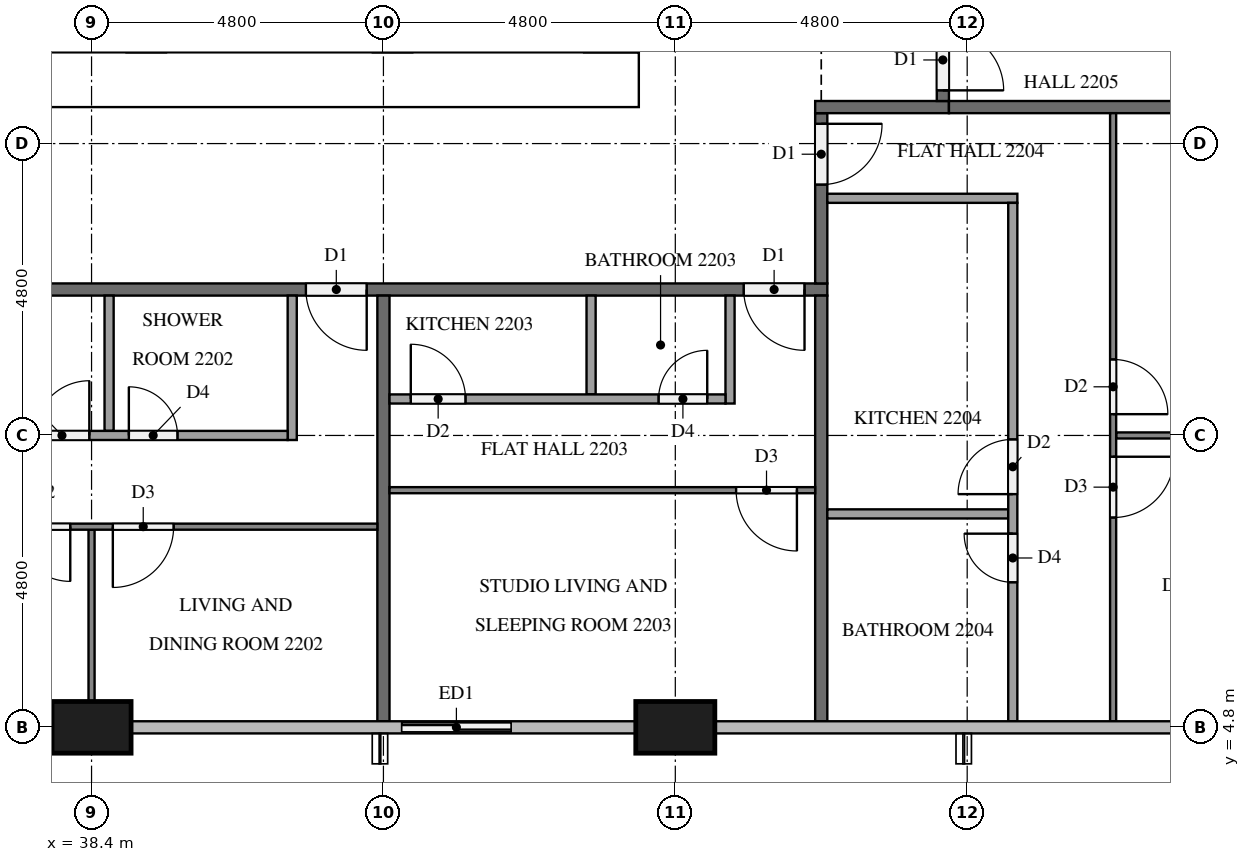
"""IFC4 building model, lengths in metres.
Left out: names, types, materials, properties, quantities, classifications, styles, units other than length and angle.
Written with IfcOpenShell. Run it as: python <this file> out.ifc"""

import sys

from ifc_helpers import new_model, si_unit, direction, frame, frame_2d, origin, origin_2d, place, context, subcontext, project, spatial, rectangle, extrude, element, fill, save


model = new_model("IFC4")
c1 = context("Model", 3, precision=1e-05, world=origin(), true_north=direction((0.0, 1.0)))
c2 = subcontext(c1, "Body", "Model", "MODEL_VIEW")
j1 = project(units=[si_unit("LENGTHUNIT", "METRE"), si_unit("PLANEANGLEUNIT", "RADIAN")], contexts=[c1])
p1 = place(None, origin())
s1 = spatial("IfcSite", under=j1, at=p1, CompositionType="ELEMENT")
p2 = place(p1, origin())
s2 = spatial("IfcBuilding", under=s1, at=p2, CompositionType="ELEMENT")
p3 = place(p2, frame((0.0, 0.0, 89.2)))
s3 = spatial("IfcBuildingStorey", under=s2, at=p3, CompositionType="ELEMENT", Elevation=89.2)
p4 = place(p3, frame((15.0, 15.45, 0.0), z_axis=(0.0, 0.0, 1.0), x_axis=(1.0, 0.0, 0.0)))
e1 = element("IfcWall", 1, at=p4, inside=s3, PredefinedType="SHEAR", context=c2, shape_type="SweptSolid", body=[
    extrude(rectangle(XDim=32.4, YDim=0.9, at=frame_2d((16.2, 0.0))), origin(), (0.0, 0.0, 1.0), 3.2),
])
p5 = place(p4, frame((15.3, 0.0, 0.0)))
e2 = element("IfcOpeningElement", 2, at=p5, cuts=e1, PredefinedType="OPENING", context=c2, shape_type="SweptSolid", body=[
    extrude(rectangle(XDim=1.8, YDim=2.1, at=frame_2d((0.9, 1.05))), frame((0.0, 0.46, 0.0), z_axis=(0.0, -1.0, 0.0), x_axis=(1.0, 0.0, 0.0)), (0.0, 0.0, 1.0), 0.92),
])
for number, where, z_axis, x_axis in (
    (3, (38.4, 4.8, 0.0), (0.0, 0.0, 1.0), (1.0, 0.0, 0.0)),
    (4, (48.0, 4.8, 0.0), (0.0, 0.0, 1.0), (1.0, 0.0, 0.0)),
):
    element("IfcColumn", number, at=place(p3, frame(where, z_axis=z_axis, x_axis=x_axis)), inside=s3, PredefinedType="COLUMN", context=c2, shape_type="SweptSolid", body=[
        extrude(rectangle(XDim=1.3, YDim=0.85, at=origin_2d()), origin(), (0.0, 0.0, 1.0), 3.2),
    ])
p6 = place(p3, frame((43.2, 4.8, 0.0), z_axis=(0.0, 0.0, 1.0), x_axis=(1.0, 0.0, 0.0)))
e5 = element("IfcWall", 5, at=p6, inside=s3, PredefinedType="SOLIDWALL", context=c2, shape_type="SweptSolid", body=[
    extrude(rectangle(XDim=2.4, YDim=0.15, at=frame_2d((1.2, 0.0))), origin(), (0.0, 0.0, 1.0), 3.2),
])
p7 = place(p6, frame((0.3, 0.0, 0.0)))
e6 = element("IfcOpeningElement", 6, at=p7, cuts=e5, PredefinedType="OPENING", context=c2, shape_type="SweptSolid", body=[
    extrude(rectangle(XDim=1.8, YDim=2.4, at=frame_2d((0.9, 1.2))), frame((0.0, 0.085, 0.0), z_axis=(0.0, -1.0, 0.0), x_axis=(1.0, 0.0, 0.0)), (0.0, 0.0, 1.0), 0.17),
])
p8 = place(p3, frame((50.5, 12.0, 0.0), z_axis=(0.0, 0.0, 1.0), x_axis=(-1.0, 0.0, 0.0)))
e7 = element("IfcWall", 7, at=p8, inside=s3, PredefinedType="PARTITIONING", context=c2, shape_type="SweptSolid", body=[
    extrude(rectangle(XDim=38.6, YDim=0.2, at=frame_2d((19.3, 0.0))), origin(), (0.0, 0.0, 1.0), 3.2),
])
p9 = place(p8, frame((21.975, 0.0, 0.0)))
e8 = element("IfcOpeningElement", 8, at=p9, cuts=e7, PredefinedType="OPENING", context=c2, shape_type="SweptSolid", body=[
    extrude(rectangle(XDim=1.0, YDim=2.1, at=frame_2d((0.5, 1.05))), frame((0.0, 0.11, 0.0), z_axis=(0.0, -1.0, 0.0), x_axis=(1.0, 0.0, 0.0)), (0.0, 0.0, 1.0), 0.22),
])
p10 = place(p8, frame((7.575, 0.0, 0.0)))
e9 = element("IfcOpeningElement", 9, at=p10, cuts=e7, PredefinedType="OPENING", context=c2, shape_type="SweptSolid", body=[
    extrude(rectangle(XDim=1.0, YDim=2.1, at=frame_2d((0.5, 1.05))), frame((0.0, 0.11, 0.0), z_axis=(0.0, -1.0, 0.0), x_axis=(1.0, 0.0, 0.0)), (0.0, 0.0, 1.0), 0.22),
])
p11 = place(p8, frame((0.375, 0.0, 0.0)))
e10 = element("IfcOpeningElement", 10, at=p11, cuts=e7, PredefinedType="OPENING", context=c2, shape_type="SweptSolid", body=[
    extrude(rectangle(XDim=1.0, YDim=2.1, at=frame_2d((0.5, 1.05))), frame((0.0, 0.11, 0.0), z_axis=(0.0, -1.0, 0.0), x_axis=(1.0, 0.0, 0.0)), (0.0, 0.0, 1.0), 0.22),
])
p12 = place(p3, frame((50.4, 14.9, 0.0), z_axis=(0.0, 0.0, 1.0), x_axis=(0.0, -1.0, 0.0)))
e11 = element("IfcWall", 11, at=p12, inside=s3, PredefinedType="PARTITIONING", context=c2, shape_type="SweptSolid", body=[
    extrude(rectangle(XDim=2.8, YDim=0.2, at=frame_2d((1.4, 0.0))), origin(), (0.0, 0.0, 1.0), 3.2),
])
p13 = place(p12, frame((0.175, 0.0, 0.0)))
e12 = element("IfcOpeningElement", 12, at=p13, cuts=e11, PredefinedType="OPENING", context=c2, shape_type="SweptSolid", body=[
    extrude(rectangle(XDim=1.0, YDim=2.1, at=frame_2d((0.5, 1.05))), frame((0.0, 0.11, 0.0), z_axis=(0.0, -1.0, 0.0), x_axis=(1.0, 0.0, 0.0)), (0.0, 0.0, 1.0), 0.22),
])
p14 = place(p3, frame((50.3, 15.0, 0.0), z_axis=(0.0, 0.0, 1.0), x_axis=(1.0, 0.0, 0.0)))
e13 = element("IfcWall", 13, at=p14, inside=s3, PredefinedType="PARTITIONING", context=c2, shape_type="SweptSolid", body=[
    extrude(rectangle(XDim=2.2, YDim=0.2, at=frame_2d((1.1, 0.0))), origin(), (0.0, 0.0, 1.0), 3.2),
])
p15 = place(p3, frame((52.4, 37.7, 0.0), z_axis=(0.0, 0.0, 1.0), x_axis=(0.0, -1.0, 0.0)))
e14 = element("IfcWall", 14, at=p15, inside=s3, PredefinedType="PARTITIONING", context=c2, shape_type="SweptSolid", body=[
    extrude(rectangle(XDim=22.6, YDim=0.2, at=frame_2d((11.3, 0.0))), origin(), (0.0, 0.0, 1.0), 3.2),
])
p16 = place(p15, frame((21.425, 0.0, 0.0)))
e15 = element("IfcOpeningElement", 15, at=p16, cuts=e14, PredefinedType="OPENING", context=c2, shape_type="SweptSolid", body=[
    extrude(rectangle(XDim=1.0, YDim=2.1, at=frame_2d((0.5, 1.05))), frame((0.0, 0.11, 0.0), z_axis=(0.0, -1.0, 0.0), x_axis=(1.0, 0.0, 0.0)), (0.0, 0.0, 1.0), 0.22),
])
p17 = place(p15, frame((0.175, 0.0, 0.0)))
e16 = element("IfcOpeningElement", 16, at=p17, cuts=e14, PredefinedType="OPENING", context=c2, shape_type="SweptSolid", body=[
    extrude(rectangle(XDim=1.0, YDim=2.1, at=frame_2d((0.5, 1.05))), frame((0.0, 0.11, 0.0), z_axis=(0.0, -1.0, 0.0), x_axis=(1.0, 0.0, 0.0)), (0.0, 0.0, 1.0), 0.22),
])
for number, where, z_axis, x_axis in (
    (17, (43.2, 11.9, 0.0), (0.0, 0.0, 1.0), (0.0, -1.0, 0.0)),
    (18, (50.4, 11.9, 0.0), (0.0, 0.0, 1.0), (0.0, -1.0, 0.0)),
):
    element("IfcWall", number, at=place(p3, frame(where, z_axis=z_axis, x_axis=x_axis)), inside=s3, PredefinedType="PARTITIONING", context=c2, shape_type="SweptSolid", body=[
        extrude(rectangle(XDim=7.0, YDim=0.2, at=frame_2d((3.5, 0.0))), origin(), (0.0, 0.0, 1.0), 3.2),
    ])
p18 = place(p3, frame((52.5, 15.0, 0.0), z_axis=(0.0, 0.0, 1.0), x_axis=(1.0, 0.0, 0.0)))
e19 = element("IfcWall", 19, at=p18, inside=s3, PredefinedType="PARTITIONING", context=c2, shape_type="SweptSolid", body=[
    extrude(rectangle(XDim=9.8, YDim=0.2, at=frame_2d((4.9, 0.0))), origin(), (0.0, 0.0, 1.0), 3.2),
])
p19 = place(p3, frame((38.4, 8.05, 0.0), z_axis=(0.0, 0.0, 1.0), x_axis=(0.0, -1.0, 0.0)))
e20 = element("IfcWall", 20, at=p19, inside=s3, PredefinedType="PARTITIONING", context=c2, shape_type="SweptSolid", body=[
    extrude(rectangle(XDim=2.825, YDim=0.1, at=frame_2d((1.413, 0.0))), origin(), (0.0, 0.0, 1.0), 3.2),
])
p20 = place(p3, frame((43.1, 8.1, 0.0), z_axis=(0.0, 0.0, 1.0), x_axis=(-1.0, 0.0, 0.0)))
e21 = element("IfcWall", 21, at=p20, inside=s3, PredefinedType="PARTITIONING", context=c2, shape_type="SweptSolid", body=[
    extrude(rectangle(XDim=14.2, YDim=0.1, at=frame_2d((7.1, 0.0))), origin(), (0.0, 0.0, 1.0), 3.2),
])
p21 = place(p20, frame((3.35, 0.0, 0.0)))
e22 = element("IfcOpeningElement", 22, at=p21, cuts=e21, PredefinedType="OPENING", context=c2, shape_type="SweptSolid", body=[
    extrude(rectangle(XDim=1.0, YDim=2.1, at=frame_2d((0.5, 1.05))), frame((0.0, 0.06, 0.0), z_axis=(0.0, -1.0, 0.0), x_axis=(1.0, 0.0, 0.0)), (0.0, 0.0, 1.0), 0.12),
])
p22 = place(p20, frame((5.05, 0.0, 0.0)))
e23 = element("IfcOpeningElement", 23, at=p22, cuts=e21, PredefinedType="OPENING", context=c2, shape_type="SweptSolid", body=[
    extrude(rectangle(XDim=0.9, YDim=2.1, at=frame_2d((0.45, 1.05))), frame((0.0, 0.06, 0.0), z_axis=(0.0, -1.0, 0.0), x_axis=(1.0, 0.0, 0.0)), (0.0, 0.0, 1.0), 0.12),
])
p23 = place(p20, frame((13.0, 0.0, 0.0)))
e24 = element("IfcOpeningElement", 24, at=p23, cuts=e21, PredefinedType="OPENING", context=c2, shape_type="SweptSolid", body=[
    extrude(rectangle(XDim=0.9, YDim=2.1, at=frame_2d((0.45, 1.05))), frame((0.0, 0.06, 0.0), z_axis=(0.0, -1.0, 0.0), x_axis=(1.0, 0.0, 0.0)), (0.0, 0.0, 1.0), 0.12),
])
p24 = place(p3, frame((38.688, 11.9, 0.0), z_axis=(0.0, 0.0, 1.0), x_axis=(0.0, -1.0, 0.0)))
e25 = element("IfcWall", 25, at=p24, inside=s3, PredefinedType="PARTITIONING", context=c2, shape_type="SweptSolid", body=[
    extrude(rectangle(XDim=2.225, YDim=0.15, at=frame_2d((1.112, 0.0))), origin(), (0.0, 0.0, 1.0), 3.2),
])
p25 = place(p3, frame((41.7, 11.9, 0.0), z_axis=(0.0, 0.0, 1.0), x_axis=(0.0, -1.0, 0.0)))
e26 = element("IfcWall", 26, at=p25, inside=s3, PredefinedType="PARTITIONING", context=c2, shape_type="SweptSolid", body=[
    extrude(rectangle(XDim=2.375, YDim=0.15, at=frame_2d((1.188, 0.0))), origin(), (0.0, 0.0, 1.0), 3.2),
])
p26 = place(p3, frame((28.9, 9.6, 0.0), z_axis=(0.0, 0.0, 1.0), x_axis=(1.0, 0.0, 0.0)))
e27 = element("IfcWall", 27, at=p26, inside=s3, PredefinedType="PARTITIONING", context=c2, shape_type="SweptSolid", body=[
    extrude(rectangle(XDim=12.725, YDim=0.15, at=frame_2d((6.363, 0.0))), origin(), (0.0, 0.0, 1.0), 3.2),
])
p27 = place(p26, frame((10.114, 0.0, 0.0)))
e28 = element("IfcOpeningElement", 28, at=p27, cuts=e27, PredefinedType="OPENING", context=c2, shape_type="SweptSolid", body=[
    extrude(rectangle(XDim=0.8, YDim=2.1, at=frame_2d((0.4, 1.05))), frame((0.0, 0.085, 0.0), z_axis=(0.0, -1.0, 0.0), x_axis=(1.0, 0.0, 0.0)), (0.0, 0.0, 1.0), 0.17),
])
p28 = place(p26, frame((8.563, 0.0, 0.0)))
e29 = element("IfcOpeningElement", 29, at=p28, cuts=e27, PredefinedType="OPENING", context=c2, shape_type="SweptSolid", body=[
    extrude(rectangle(XDim=0.9, YDim=2.1, at=frame_2d((0.45, 1.05))), frame((0.0, 0.085, 0.0), z_axis=(0.0, -1.0, 0.0), x_axis=(1.0, 0.0, 0.0)), (0.0, 0.0, 1.0), 0.17),
])
p29 = place(p26, frame((0.35, 0.0, 0.0)))
e30 = element("IfcOpeningElement", 30, at=p29, cuts=e27, PredefinedType="OPENING", context=c2, shape_type="SweptSolid", body=[
    extrude(rectangle(XDim=0.9, YDim=2.1, at=frame_2d((0.45, 1.05))), frame((0.0, 0.085, 0.0), z_axis=(0.0, -1.0, 0.0), x_axis=(1.0, 0.0, 0.0)), (0.0, 0.0, 1.0), 0.17),
])
p30 = place(p3, frame((50.3, 8.7, 0.0), z_axis=(0.0, 0.0, 1.0), x_axis=(-1.0, 0.0, 0.0)))
e31 = element("IfcWall", 31, at=p30, inside=s3, PredefinedType="PARTITIONING", context=c2, shape_type="SweptSolid", body=[
    extrude(rectangle(XDim=7.0, YDim=0.1, at=frame_2d((3.5, 0.0))), origin(), (0.0, 0.0, 1.0), 3.2),
])
p31 = place(p30, frame((0.3, 0.0, 0.0)))
e32 = element("IfcOpeningElement", 32, at=p31, cuts=e31, PredefinedType="OPENING", context=c2, shape_type="SweptSolid", body=[
    extrude(rectangle(XDim=1.0, YDim=2.1, at=frame_2d((0.5, 1.05))), frame((0.0, 0.06, 0.0), z_axis=(0.0, -1.0, 0.0), x_axis=(1.0, 0.0, 0.0)), (0.0, 0.0, 1.0), 0.12),
])
p32 = place(p3, frame((46.615, 11.9, 0.0), z_axis=(0.0, 0.0, 1.0), x_axis=(0.0, -1.0, 0.0)))
e33 = element("IfcWall", 33, at=p32, inside=s3, PredefinedType="PARTITIONING", context=c2, shape_type="SweptSolid", body=[
    extrude(rectangle(XDim=1.625, YDim=0.15, at=frame_2d((0.812, 0.0))), origin(), (0.0, 0.0, 1.0), 3.2),
])
p33 = place(p3, frame((48.9, 11.9, 0.0), z_axis=(0.0, 0.0, 1.0), x_axis=(0.0, -1.0, 0.0)))
e34 = element("IfcWall", 34, at=p33, inside=s3, PredefinedType="PARTITIONING", context=c2, shape_type="SweptSolid", body=[
    extrude(rectangle(XDim=1.775, YDim=0.15, at=frame_2d((0.887, 0.0))), origin(), (0.0, 0.0, 1.0), 3.2),
])
p34 = place(p3, frame((43.3, 10.2, 0.0), z_axis=(0.0, 0.0, 1.0), x_axis=(1.0, 0.0, 0.0)))
e35 = element("IfcWall", 35, at=p34, inside=s3, PredefinedType="PARTITIONING", context=c2, shape_type="SweptSolid", body=[
    extrude(rectangle(XDim=5.525, YDim=0.15, at=frame_2d((2.762, 0.0))), origin(), (0.0, 0.0, 1.0), 3.2),
])
p35 = place(p34, frame((4.425, 0.0, 0.0)))
e36 = element("IfcOpeningElement", 36, at=p35, cuts=e35, PredefinedType="OPENING", context=c2, shape_type="SweptSolid", body=[
    extrude(rectangle(XDim=0.8, YDim=2.1, at=frame_2d((0.4, 1.05))), frame((0.0, 0.085, 0.0), z_axis=(0.0, -1.0, 0.0), x_axis=(1.0, 0.0, 0.0)), (0.0, 0.0, 1.0), 0.17),
])
p36 = place(p34, frame((0.35, 0.0, 0.0)))
e37 = element("IfcOpeningElement", 37, at=p36, cuts=e35, PredefinedType="OPENING", context=c2, shape_type="SweptSolid", body=[
    extrude(rectangle(XDim=0.9, YDim=2.1, at=frame_2d((0.45, 1.05))), frame((0.0, 0.085, 0.0), z_axis=(0.0, -1.0, 0.0), x_axis=(1.0, 0.0, 0.0)), (0.0, 0.0, 1.0), 0.17),
])
p37 = place(p3, frame((55.25, 9.6, 0.0), z_axis=(0.0, 0.0, 1.0), x_axis=(1.0, 0.0, 0.0)))
e38 = element("IfcWall", 38, at=p37, inside=s3, PredefinedType="PARTITIONING", context=c2, shape_type="SweptSolid", body=[
    extrude(rectangle(XDim=6.575, YDim=0.1, at=frame_2d((3.288, 0.0))), origin(), (0.0, 0.0, 1.0), 3.2),
])
p38 = place(p3, frame((55.2, 14.9, 0.0), z_axis=(0.0, 0.0, 1.0), x_axis=(0.0, -1.0, 0.0)))
e39 = element("IfcWall", 39, at=p38, inside=s3, PredefinedType="PARTITIONING", context=c2, shape_type="SweptSolid", body=[
    extrude(rectangle(XDim=10.0, YDim=0.1, at=frame_2d((5.0, 0.0))), origin(), (0.0, 0.0, 1.0), 3.2),
])
p39 = place(p38, frame((4.05, 0.0, 0.0)))
e40 = element("IfcOpeningElement", 40, at=p39, cuts=e39, PredefinedType="OPENING", context=c2, shape_type="SweptSolid", body=[
    extrude(rectangle(XDim=0.9, YDim=2.1, at=frame_2d((0.45, 1.05))), frame((0.0, 0.06, 0.0), z_axis=(0.0, -1.0, 0.0), x_axis=(1.0, 0.0, 0.0)), (0.0, 0.0, 1.0), 0.12),
])
p40 = place(p38, frame((5.65, 0.0, 0.0)))
e41 = element("IfcOpeningElement", 41, at=p40, cuts=e39, PredefinedType="OPENING", context=c2, shape_type="SweptSolid", body=[
    extrude(rectangle(XDim=1.0, YDim=2.1, at=frame_2d((0.5, 1.05))), frame((0.0, 0.06, 0.0), z_axis=(0.0, -1.0, 0.0), x_axis=(1.0, 0.0, 0.0)), (0.0, 0.0, 1.0), 0.12),
])
p41 = place(p3, frame((50.5, 8.31, 0.0), z_axis=(0.0, 0.0, 1.0), x_axis=(1.0, 0.0, 0.0)))
e42 = element("IfcWall", 42, at=p41, inside=s3, PredefinedType="PARTITIONING", context=c2, shape_type="SweptSolid", body=[
    extrude(rectangle(XDim=2.975, YDim=0.15, at=frame_2d((1.488, 0.0))), origin(), (0.0, 0.0, 1.0), 3.2),
])
p42 = place(p3, frame((50.5, 13.5, 0.0), z_axis=(0.0, 0.0, 1.0), x_axis=(1.0, 0.0, 0.0)))
e43 = element("IfcWall", 43, at=p42, inside=s3, PredefinedType="PARTITIONING", context=c2, shape_type="SweptSolid", body=[
    extrude(rectangle(XDim=3.125, YDim=0.15, at=frame_2d((1.562, 0.0))), origin(), (0.0, 0.0, 1.0), 3.2),
])
p43 = place(p3, frame((53.55, 4.9, 0.0), z_axis=(0.0, 0.0, 1.0), x_axis=(0.0, 1.0, 0.0)))
e44 = element("IfcWall", 44, at=p43, inside=s3, PredefinedType="PARTITIONING", context=c2, shape_type="SweptSolid", body=[
    extrude(rectangle(XDim=8.525, YDim=0.15, at=frame_2d((4.263, 0.0))), origin(), (0.0, 0.0, 1.0), 3.2),
])
p44 = place(p43, frame((3.735, 0.0, 0.0)))
e45 = element("IfcOpeningElement", 45, at=p44, cuts=e44, PredefinedType="OPENING", context=c2, shape_type="SweptSolid", body=[
    extrude(rectangle(XDim=0.9, YDim=2.1, at=frame_2d((0.45, 1.05))), frame((0.0, 0.085, 0.0), z_axis=(0.0, -1.0, 0.0), x_axis=(1.0, 0.0, 0.0)), (0.0, 0.0, 1.0), 0.17),
])
p45 = place(p43, frame((2.285, 0.0, 0.0)))
e46 = element("IfcOpeningElement", 46, at=p45, cuts=e44, PredefinedType="OPENING", context=c2, shape_type="SweptSolid", body=[
    extrude(rectangle(XDim=0.8, YDim=2.1, at=frame_2d((0.4, 1.05))), frame((0.0, 0.085, 0.0), z_axis=(0.0, -1.0, 0.0), x_axis=(1.0, 0.0, 0.0)), (0.0, 0.0, 1.0), 0.17),
])
p46 = place(p7, origin())
e47 = element("IfcDoor", 47, at=p46, inside=s3, OperationType="SLIDING_TO_LEFT", PredefinedType="DOOR", context=c2, shape_type="SweptSolid", body=[
    extrude(rectangle(XDim=1.8, YDim=2.4, at=frame_2d((0.9, 1.2))), frame((0.0, 0.025, 0.0), z_axis=(0.0, -1.0, 0.0), x_axis=(1.0, 0.0, 0.0)), (0.0, 0.0, 1.0), 0.05),
])
fill(e6, e47)
p47 = place(p10, origin())
e48 = element("IfcDoor", 48, at=p47, inside=s3, OperationType="SINGLE_SWING_LEFT", PredefinedType="DOOR", context=c2, shape_type="SweptSolid", body=[
    extrude(rectangle(XDim=1.0, YDim=2.1, at=frame_2d((0.5, 1.05))), frame((0.0, 0.025, 0.0), z_axis=(0.0, -1.0, 0.0), x_axis=(1.0, 0.0, 0.0)), (0.0, 0.0, 1.0), 0.05),
])
fill(e9, e48)
p48 = place(p11, origin())
e49 = element("IfcDoor", 49, at=p48, inside=s3, OperationType="SINGLE_SWING_LEFT", PredefinedType="DOOR", context=c2, shape_type="SweptSolid", body=[
    extrude(rectangle(XDim=1.0, YDim=2.1, at=frame_2d((0.5, 1.05))), frame((0.0, 0.025, 0.0), z_axis=(0.0, -1.0, 0.0), x_axis=(1.0, 0.0, 0.0)), (0.0, 0.0, 1.0), 0.05),
])
fill(e10, e49)
p49 = place(p13, origin())
e50 = element("IfcDoor", 50, at=p49, inside=s3, OperationType="SINGLE_SWING_LEFT", PredefinedType="DOOR", context=c2, shape_type="SweptSolid", body=[
    extrude(rectangle(XDim=1.0, YDim=2.1, at=frame_2d((0.5, 1.05))), frame((0.0, 0.025, 0.0), z_axis=(0.0, -1.0, 0.0), x_axis=(1.0, 0.0, 0.0)), (0.0, 0.0, 1.0), 0.05),
])
fill(e12, e50)
p50 = place(p16, origin())
e51 = element("IfcDoor", 51, at=p50, inside=s3, OperationType="SINGLE_SWING_RIGHT", PredefinedType="DOOR", context=c2, shape_type="SweptSolid", body=[
    extrude(rectangle(XDim=1.0, YDim=2.1, at=frame_2d((0.5, 1.05))), frame((0.0, 0.025, 0.0), z_axis=(0.0, -1.0, 0.0), x_axis=(1.0, 0.0, 0.0)), (0.0, 0.0, 1.0), 0.05),
])
fill(e15, e51)
p51 = place(p21, origin())
e52 = element("IfcDoor", 52, at=p51, inside=s3, OperationType="SINGLE_SWING_RIGHT", PredefinedType="DOOR", context=c2, shape_type="SweptSolid", body=[
    extrude(rectangle(XDim=1.0, YDim=2.1, at=frame_2d((0.5, 1.05))), frame((0.0, 0.025, 0.0), z_axis=(0.0, -1.0, 0.0), x_axis=(1.0, 0.0, 0.0)), (0.0, 0.0, 1.0), 0.05),
])
fill(e22, e52)
p52 = place(p22, origin())
e53 = element("IfcDoor", 53, at=p52, inside=s3, OperationType="SINGLE_SWING_LEFT", PredefinedType="DOOR", context=c2, shape_type="SweptSolid", body=[
    extrude(rectangle(XDim=0.9, YDim=2.1, at=frame_2d((0.45, 1.05))), frame((0.0, 0.025, 0.0), z_axis=(0.0, -1.0, 0.0), x_axis=(1.0, 0.0, 0.0)), (0.0, 0.0, 1.0), 0.05),
])
fill(e23, e53)
p53 = place(p27, origin())
e54 = element("IfcDoor", 54, at=p53, inside=s3, OperationType="SINGLE_SWING_LEFT", PredefinedType="DOOR", context=c2, shape_type="SweptSolid", body=[
    extrude(rectangle(XDim=0.8, YDim=2.1, at=frame_2d((0.4, 1.05))), frame((0.0, 0.025, 0.0), z_axis=(0.0, -1.0, 0.0), x_axis=(1.0, 0.0, 0.0)), (0.0, 0.0, 1.0), 0.05),
])
fill(e28, e54)
p54 = place(p28, origin())
e55 = element("IfcDoor", 55, at=p54, inside=s3, OperationType="SINGLE_SWING_RIGHT", PredefinedType="DOOR", context=c2, shape_type="SweptSolid", body=[
    extrude(rectangle(XDim=0.9, YDim=2.1, at=frame_2d((0.45, 1.05))), frame((0.0, 0.025, 0.0), z_axis=(0.0, -1.0, 0.0), x_axis=(1.0, 0.0, 0.0)), (0.0, 0.0, 1.0), 0.05),
])
fill(e29, e55)
p55 = place(p31, origin())
e56 = element("IfcDoor", 56, at=p55, inside=s3, OperationType="SINGLE_SWING_LEFT", PredefinedType="DOOR", context=c2, shape_type="SweptSolid", body=[
    extrude(rectangle(XDim=1.0, YDim=2.1, at=frame_2d((0.5, 1.05))), frame((0.0, 0.025, 0.0), z_axis=(0.0, -1.0, 0.0), x_axis=(1.0, 0.0, 0.0)), (0.0, 0.0, 1.0), 0.05),
])
fill(e32, e56)
p56 = place(p35, origin())
e57 = element("IfcDoor", 57, at=p56, inside=s3, OperationType="SINGLE_SWING_RIGHT", PredefinedType="DOOR", context=c2, shape_type="SweptSolid", body=[
    extrude(rectangle(XDim=0.8, YDim=2.1, at=frame_2d((0.4, 1.05))), frame((0.0, 0.025, 0.0), z_axis=(0.0, -1.0, 0.0), x_axis=(1.0, 0.0, 0.0)), (0.0, 0.0, 1.0), 0.05),
])
fill(e36, e57)
p57 = place(p36, origin())
e58 = element("IfcDoor", 58, at=p57, inside=s3, OperationType="SINGLE_SWING_LEFT", PredefinedType="DOOR", context=c2, shape_type="SweptSolid", body=[
    extrude(rectangle(XDim=0.9, YDim=2.1, at=frame_2d((0.45, 1.05))), frame((0.0, 0.025, 0.0), z_axis=(0.0, -1.0, 0.0), x_axis=(1.0, 0.0, 0.0)), (0.0, 0.0, 1.0), 0.05),
])
fill(e37, e58)
p58 = place(p39, origin())
e59 = element("IfcDoor", 59, at=p58, inside=s3, OperationType="SINGLE_SWING_RIGHT", PredefinedType="DOOR", context=c2, shape_type="SweptSolid", body=[
    extrude(rectangle(XDim=0.9, YDim=2.1, at=frame_2d((0.45, 1.05))), frame((0.0, 0.025, 0.0), z_axis=(0.0, -1.0, 0.0), x_axis=(1.0, 0.0, 0.0)), (0.0, 0.0, 1.0), 0.05),
])
fill(e40, e59)
p59 = place(p40, origin())
e60 = element("IfcDoor", 60, at=p59, inside=s3, OperationType="SINGLE_SWING_LEFT", PredefinedType="DOOR", context=c2, shape_type="SweptSolid", body=[
    extrude(rectangle(XDim=1.0, YDim=2.1, at=frame_2d((0.5, 1.05))), frame((0.0, 0.025, 0.0), z_axis=(0.0, -1.0, 0.0), x_axis=(1.0, 0.0, 0.0)), (0.0, 0.0, 1.0), 0.05),
])
fill(e41, e60)
p60 = place(p44, origin())
e61 = element("IfcDoor", 61, at=p60, inside=s3, OperationType="SINGLE_SWING_LEFT", PredefinedType="DOOR", context=c2, shape_type="SweptSolid", body=[
    extrude(rectangle(XDim=0.9, YDim=2.1, at=frame_2d((0.45, 1.05))), frame((0.0, 0.025, 0.0), z_axis=(0.0, -1.0, 0.0), x_axis=(1.0, 0.0, 0.0)), (0.0, 0.0, 1.0), 0.05),
])
fill(e45, e61)
p61 = place(p45, origin())
e62 = element("IfcDoor", 62, at=p61, inside=s3, OperationType="SINGLE_SWING_RIGHT", PredefinedType="DOOR", context=c2, shape_type="SweptSolid", body=[
    extrude(rectangle(XDim=0.8, YDim=2.1, at=frame_2d((0.4, 1.05))), frame((0.0, 0.025, 0.0), z_axis=(0.0, -1.0, 0.0), x_axis=(1.0, 0.0, 0.0)), (0.0, 0.0, 1.0), 0.05),
])
fill(e46, e62)
save(model, sys.argv[1])
